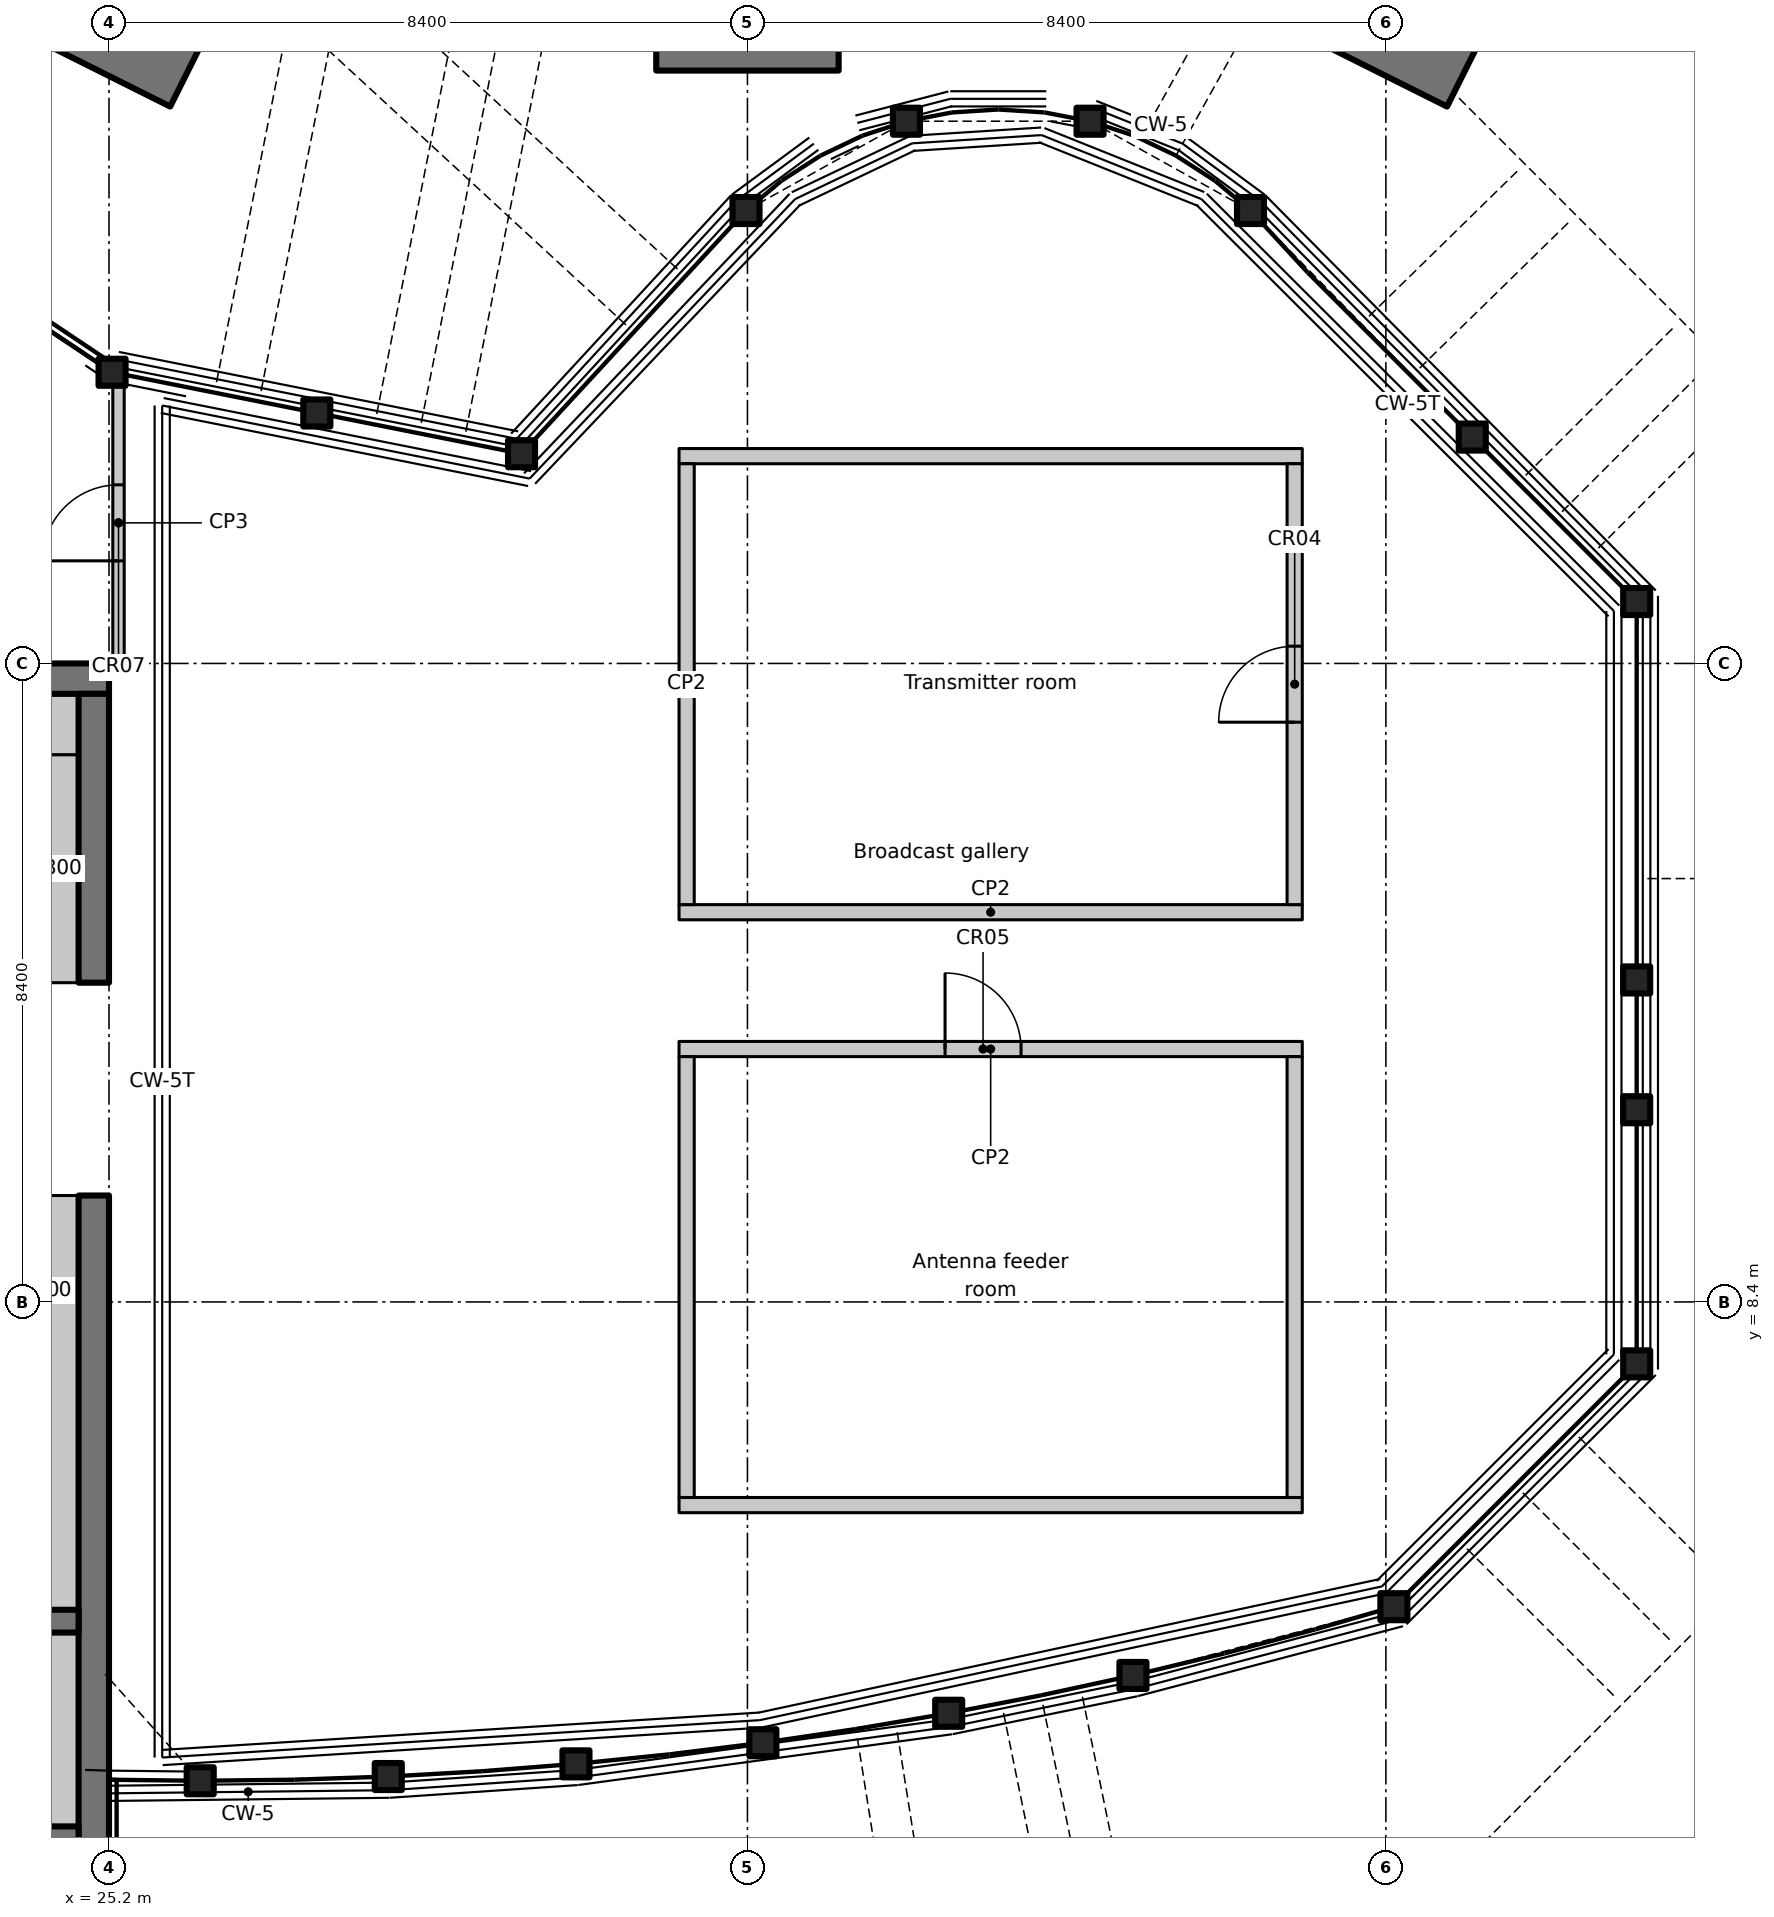
"""IFC4 building model, lengths in metres.
Left out: names, types, materials, properties, quantities, classifications, styles, units other than length and angle.
Written with IfcOpenShell. Run it as: python <this file> out.ifc"""

import sys

from ifc_helpers import new_model, si_unit, direction, frame, frame_2d, origin, origin_2d, place, context, subcontext, project, spatial, rectangle, hollow_circle, extrude, element, fill, save


model = new_model("IFC4")
c1 = context("Model", 3, precision=1e-05, world=origin(), true_north=direction((0.0, 1.0)))
c2 = subcontext(c1, "Body", "Model", "MODEL_VIEW")
j1 = project(units=[si_unit("LENGTHUNIT", "METRE"), si_unit("PLANEANGLEUNIT", "RADIAN")], contexts=[c1])
p1 = place(None, origin())
s1 = spatial("IfcSite", under=j1, at=p1, CompositionType="ELEMENT")
p2 = place(p1, origin())
s2 = spatial("IfcBuilding", under=s1, at=p2, CompositionType="ELEMENT")
p3 = place(p2, frame((0.0, 0.0, 264.2)))
s3 = spatial("IfcBuildingStorey", under=s2, at=p3, CompositionType="ELEMENT", Elevation=264.2)
p4 = place(p3, frame((26.273, 24.663, 0.0), z_axis=(0.0, 0.0, 1.0), x_axis=(-0.894427191, 0.4472135955, 0.0)))
e1 = element("IfcWall", 1, at=p4, inside=s3, PredefinedType="SOLIDWALL", context=c2, shape_type="SweptSolid", body=[
    extrude(rectangle(XDim=2.4, YDim=1.2, at=frame_2d((1.2, 0.0))), origin(), (0.0, 0.0, 1.0), 4.7),
])
p5 = place(p3, frame((34.8, 25.2, 0.0), z_axis=(0.0, 0.0, 1.0), x_axis=(-1.0, 0.0, 0.0)))
e2 = element("IfcWall", 2, at=p5, inside=s3, PredefinedType="SOLIDWALL", context=c2, shape_type="SweptSolid", body=[
    extrude(rectangle(XDim=2.4, YDim=1.2, at=frame_2d((1.2, 0.0))), origin(), (0.0, 0.0, 1.0), 4.7),
])
p6 = place(p3, frame((43.073, 24.663, 0.0), z_axis=(0.0, 0.0, 1.0), x_axis=(-0.894427191, 0.4472135955, 0.0)))
e3 = element("IfcWall", 3, at=p6, inside=s3, PredefinedType="SOLIDWALL", context=c2, shape_type="SweptSolid", body=[
    extrude(rectangle(XDim=2.4, YDim=1.2, at=frame_2d((1.2, 0.0))), origin(), (0.0, 0.0, 1.0), 4.7),
])
for number, where, z_axis, x_axis in (
    (4, (25.24, 20.631, 0.0), (0.0, 0.0, 1.0), (1.0, 0.0, 0.0)),
    (5, (27.934, 20.095, 0.0), (0.0, 0.0, 1.0), (1.0, 0.0, 0.0)),
    (6, (30.628, 19.559, 0.0), (0.0, 0.0, 1.0), (1.0, 0.0, 0.0)),
    (7, (33.581, 22.759, 0.0), (0.0, 0.0, 1.0), (1.0, 0.0, 0.0)),
    (8, (35.692, 23.934, 0.0), (0.0, 0.0, 1.0), (1.0, 0.0, 0.0)),
    (9, (38.108, 23.934, 0.0), (0.0, 0.0, 1.0), (1.0, 0.0, 0.0)),
    (10, (40.219, 22.759, 0.0), (0.0, 0.0, 1.0), (1.0, 0.0, 0.0)),
    (11, (43.136, 19.778, 0.0), (0.0, 0.0, 1.0), (1.0, 0.0, 0.0)),
    (12, (45.3, 17.615, 0.0), (0.0, 0.0, 1.0), (1.0, 0.0, 0.0)),
    (13, (45.3, 12.636, 0.0), (0.0, 0.0, 1.0), (1.0, 0.0, 0.0)),
    (14, (45.3, 10.928, 0.0), (0.0, 0.0, 1.0), (1.0, 0.0, 0.0)),
    (15, (45.3, 7.585, 0.0), (0.0, 0.0, 1.0), (1.0, 0.0, 0.0)),
    (16, (42.105, 4.391, 0.0), (0.0, 0.0, 1.0), (1.0, 0.0, 0.0)),
    (17, (38.672, 3.486, 0.0), (0.0, 0.0, 1.0), (1.0, 0.0, 0.0)),
    (18, (36.248, 2.989, 0.0), (0.0, 0.0, 1.0), (1.0, 0.0, 0.0)),
    (19, (33.803, 2.601, 0.0), (0.0, 0.0, 1.0), (1.0, 0.0, 0.0)),
    (20, (31.344, 2.323, 0.0), (0.0, 0.0, 1.0), (1.0, 0.0, 0.0)),
    (21, (28.875, 2.156, 0.0), (0.0, 0.0, 1.0), (1.0, 0.0, 0.0)),
    (22, (26.4, 2.1, 0.0), (0.0, 0.0, 1.0), (1.0, 0.0, 0.0)),
):
    element("IfcColumn", number, at=place(p3, frame(where, z_axis=z_axis, x_axis=x_axis)), inside=s3, PredefinedType="COLUMN", context=c2, shape_type="SweptSolid", body=[
        extrude(hollow_circle(Radius=0.178, WallThickness=0.012, at=origin_2d()), origin(), (0.0, 0.0, 1.0), 4.7),
    ])
p7 = place(p3, frame((23.8, 16.6, 0.0), z_axis=(0.0, 0.0, 1.0), x_axis=(1.0, 0.0, 0.0)))
e23 = element("IfcWall", 23, at=p7, inside=s3, PredefinedType="SHEAR", context=c2, shape_type="SweptSolid", body=[
    extrude(rectangle(XDim=1.4, YDim=0.4, at=frame_2d((0.7, 0.0))), origin(), (0.0, 0.0, 1.0), 4.7),
])
p8 = place(p3, frame((25.0, 0.4, 0.0), z_axis=(0.0, 0.0, 1.0), x_axis=(0.0, 1.0, 0.0)))
e24 = element("IfcWall", 24, at=p8, inside=s3, PredefinedType="SHEAR", context=c2, shape_type="SweptSolid", body=[
    extrude(rectangle(XDim=9.4, YDim=0.4, at=frame_2d((4.7, 0.0))), origin(), (0.0, 0.0, 1.0), 4.7),
])
p9 = place(p3, frame((25.0, 12.6, 0.0), z_axis=(0.0, 0.0, 1.0), x_axis=(0.0, 1.0, 0.0)))
e25 = element("IfcWall", 25, at=p9, inside=s3, PredefinedType="SHEAR", context=c2, shape_type="SweptSolid", body=[
    extrude(rectangle(XDim=3.8, YDim=0.4, at=frame_2d((1.9, 0.0))), origin(), (0.0, 0.0, 1.0), 4.7),
])
p10 = place(p3, frame((24.4, 12.6, 0.0), z_axis=(0.0, 0.0, 1.0), x_axis=(0.0, 1.0, 0.0)))
e26 = element("IfcWall", 26, at=p10, inside=s3, PredefinedType="PARTITIONING", context=c2, shape_type="SweptSolid", body=[
    extrude(rectangle(XDim=3.0, YDim=0.8, at=frame_2d((1.5, 0.0))), origin(), (0.0, 0.0, 1.0), 4.7),
])
p11 = place(p3, frame((23.8, 16.0, 0.0), z_axis=(0.0, 0.0, 1.0), x_axis=(1.0, 0.0, 0.0)))
e27 = element("IfcWall", 27, at=p11, inside=s3, PredefinedType="PARTITIONING", context=c2, shape_type="SweptSolid", body=[
    extrude(rectangle(XDim=1.0, YDim=0.8, at=frame_2d((0.5, 0.0))), origin(), (0.0, 0.0, 1.0), 4.7),
])
p12 = place(p3, frame((15.8, 1.35, 0.0), z_axis=(0.0, 0.0, 1.0), x_axis=(1.0, 0.0, 0.0)))
e28 = element("IfcWall", 28, at=p12, inside=s3, PredefinedType="SHEAR", context=c2, shape_type="SweptSolid", body=[
    extrude(rectangle(XDim=9.0, YDim=0.3, at=frame_2d((4.5, 0.0))), origin(), (0.0, 0.0, 1.0), 4.7),
])
p13 = place(p3, frame((15.8, 4.2, 0.0), z_axis=(0.0, 0.0, 1.0), x_axis=(1.0, 0.0, 0.0)))
e29 = element("IfcWall", 29, at=p13, inside=s3, PredefinedType="SHEAR", context=c2, shape_type="SweptSolid", body=[
    extrude(rectangle(XDim=9.0, YDim=0.3, at=frame_2d((4.5, 0.0))), origin(), (0.0, 0.0, 1.0), 4.7),
])
p14 = place(p13, frame((0.4, 0.0, 0.0)))
e30 = element("IfcOpeningElement", 30, at=p14, cuts=e29, PredefinedType="OPENING", context=c2, shape_type="SweptSolid", body=[
    extrude(rectangle(XDim=1.0, YDim=2.1, at=frame_2d((0.5, 1.05))), frame((0.0, 0.16, 0.0), z_axis=(0.0, -1.0, 0.0), x_axis=(1.0, 0.0, 0.0)), (0.0, 0.0, 1.0), 0.32),
])
p15 = place(p3, frame((24.4, 1.5, 0.0), z_axis=(0.0, 0.0, 1.0), x_axis=(0.0, 1.0, 0.0)))
e31 = element("IfcWall", 31, at=p15, inside=s3, PredefinedType="PARTITIONING", context=c2, shape_type="SweptSolid", body=[
    extrude(rectangle(XDim=2.55, YDim=0.8, at=frame_2d((1.275, 0.0))), origin(), (0.0, 0.0, 1.0), 4.7),
])
p16 = place(p3, frame((24.4, 4.35, 0.0), z_axis=(0.0, 0.0, 1.0), x_axis=(0.0, 1.0, 0.0)))
e32 = element("IfcWall", 32, at=p16, inside=s3, PredefinedType="PARTITIONING", context=c2, shape_type="SweptSolid", body=[
    extrude(rectangle(XDim=5.45, YDim=0.8, at=frame_2d((2.725, 0.0))), origin(), (0.0, 0.0, 1.0), 4.7),
])
for number, where, z_axis, x_axis in (
    (33, (32.7, 13.527, 0.0), (0.0, 0.0, 1.0), (1.0, 0.0, 0.0)),
    (34, (32.7, 19.527, 0.0), (0.0, 0.0, 1.0), (1.0, 0.0, 0.0)),
):
    element("IfcWall", number, at=place(p3, frame(where, z_axis=z_axis, x_axis=x_axis)), inside=s3, PredefinedType="PARTITIONING", context=c2, shape_type="SweptSolid", body=[
        extrude(rectangle(XDim=8.2, YDim=0.2, at=frame_2d((4.1, 0.0))), origin(), (0.0, 0.0, 1.0), 4.7),
    ])
p17 = place(p3, frame((32.8, 13.627, 0.0), z_axis=(0.0, 0.0, 1.0), x_axis=(0.0, 1.0, 0.0)))
e35 = element("IfcWall", 35, at=p17, inside=s3, PredefinedType="PARTITIONING", context=c2, shape_type="SweptSolid", body=[
    extrude(rectangle(XDim=5.8, YDim=0.2, at=frame_2d((2.9, 0.0))), origin(), (0.0, 0.0, 1.0), 4.7),
])
p18 = place(p3, frame((40.8, 13.627, 0.0), z_axis=(0.0, 0.0, 1.0), x_axis=(0.0, 1.0, 0.0)))
e36 = element("IfcWall", 36, at=p18, inside=s3, PredefinedType="PARTITIONING", context=c2, shape_type="SweptSolid", body=[
    extrude(rectangle(XDim=5.8, YDim=0.2, at=frame_2d((2.9, 0.0))), origin(), (0.0, 0.0, 1.0), 4.7),
])
p19 = place(p18, frame((2.4, 0.0, 0.0)))
e37 = element("IfcOpeningElement", 37, at=p19, cuts=e36, PredefinedType="OPENING", context=c2, shape_type="SweptSolid", body=[
    extrude(rectangle(XDim=1.0, YDim=2.1, at=frame_2d((0.5, 1.05))), frame((0.0, 0.11, 0.0), z_axis=(0.0, -1.0, 0.0), x_axis=(1.0, 0.0, 0.0)), (0.0, 0.0, 1.0), 0.22),
])
p20 = place(p3, frame((32.7, 5.727, 0.0), z_axis=(0.0, 0.0, 1.0), x_axis=(1.0, 0.0, 0.0)))
e38 = element("IfcWall", 38, at=p20, inside=s3, PredefinedType="PARTITIONING", context=c2, shape_type="SweptSolid", body=[
    extrude(rectangle(XDim=8.2, YDim=0.2, at=frame_2d((4.1, 0.0))), origin(), (0.0, 0.0, 1.0), 4.7),
])
p21 = place(p3, frame((32.7, 11.727, 0.0), z_axis=(0.0, 0.0, 1.0), x_axis=(1.0, 0.0, 0.0)))
e39 = element("IfcWall", 39, at=p21, inside=s3, PredefinedType="PARTITIONING", context=c2, shape_type="SweptSolid", body=[
    extrude(rectangle(XDim=8.2, YDim=0.2, at=frame_2d((4.1, 0.0))), origin(), (0.0, 0.0, 1.0), 4.7),
])
p22 = place(p21, frame((3.5, 0.0, 0.0)))
e40 = element("IfcOpeningElement", 40, at=p22, cuts=e39, PredefinedType="OPENING", context=c2, shape_type="SweptSolid", body=[
    extrude(rectangle(XDim=1.0, YDim=2.1, at=frame_2d((0.5, 1.05))), frame((0.0, 0.11, 0.0), z_axis=(0.0, -1.0, 0.0), x_axis=(1.0, 0.0, 0.0)), (0.0, 0.0, 1.0), 0.22),
])
for number, where, z_axis, x_axis in (
    (41, (32.8, 5.827, 0.0), (0.0, 0.0, 1.0), (0.0, 1.0, 0.0)),
    (42, (40.8, 5.827, 0.0), (0.0, 0.0, 1.0), (0.0, 1.0, 0.0)),
):
    element("IfcWall", number, at=place(p3, frame(where, z_axis=z_axis, x_axis=x_axis)), inside=s3, PredefinedType="PARTITIONING", context=c2, shape_type="SweptSolid", body=[
        extrude(rectangle(XDim=5.8, YDim=0.2, at=frame_2d((2.9, 0.0))), origin(), (0.0, 0.0, 1.0), 4.7),
    ])
p23 = place(p3, frame((25.325, 16.6, 0.0), z_axis=(0.0, 0.0, 1.0), x_axis=(0.0, 1.0, 0.0)))
e43 = element("IfcWall", 43, at=p23, inside=s3, PredefinedType="PARTITIONING", context=c2, shape_type="SweptSolid", body=[
    extrude(rectangle(XDim=4.1, YDim=0.15, at=frame_2d((2.05, 0.0))), origin(), (0.0, 0.0, 1.0), 4.7),
])
p24 = place(p23, frame((1.55, 0.0, 0.0)))
e44 = element("IfcOpeningElement", 44, at=p24, cuts=e43, PredefinedType="OPENING", context=c2, shape_type="SweptSolid", body=[
    extrude(rectangle(XDim=1.0, YDim=2.1, at=frame_2d((0.5, 1.05))), frame((0.0, 0.085, 0.0), z_axis=(0.0, -1.0, 0.0), x_axis=(1.0, 0.0, 0.0)), (0.0, 0.0, 1.0), 0.17),
])
p25 = place(p19, origin())
e45 = element("IfcDoor", 45, at=p25, inside=s3, OperationType="SINGLE_SWING_LEFT", PredefinedType="DOOR", context=c2, shape_type="SweptSolid", body=[
    extrude(rectangle(XDim=1.0, YDim=2.1, at=frame_2d((0.5, 1.05))), frame((0.0, 0.025, 0.0), z_axis=(0.0, -1.0, 0.0), x_axis=(1.0, 0.0, 0.0)), (0.0, 0.0, 1.0), 0.05),
])
fill(e37, e45)
p26 = place(p22, origin())
e46 = element("IfcDoor", 46, at=p26, inside=s3, OperationType="SINGLE_SWING_LEFT", PredefinedType="DOOR", context=c2, shape_type="SweptSolid", body=[
    extrude(rectangle(XDim=1.0, YDim=2.1, at=frame_2d((0.5, 1.05))), frame((0.0, 0.025, 0.0), z_axis=(0.0, -1.0, 0.0), x_axis=(1.0, 0.0, 0.0)), (0.0, 0.0, 1.0), 0.05),
])
fill(e40, e46)
p27 = place(p24, origin())
e47 = element("IfcDoor", 47, at=p27, inside=s3, OperationType="SINGLE_SWING_LEFT", PredefinedType="DOOR", context=c2, shape_type="SweptSolid", body=[
    extrude(rectangle(XDim=1.0, YDim=2.1, at=frame_2d((0.5, 1.05))), frame((0.0, 0.025, 0.0), z_axis=(0.0, -1.0, 0.0), x_axis=(1.0, 0.0, 0.0)), (0.0, 0.0, 1.0), 0.05),
])
fill(e44, e47)
save(model, sys.argv[1])
